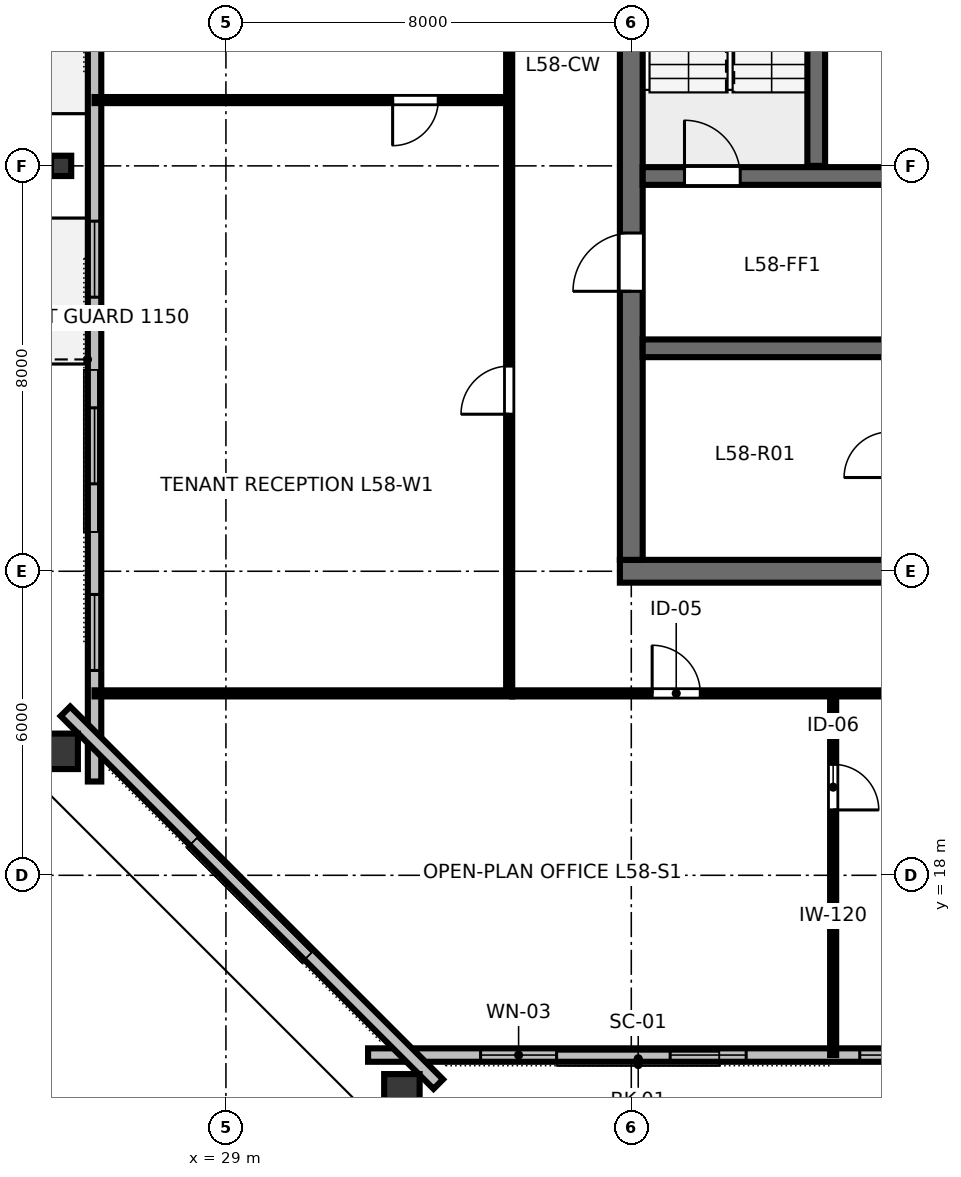
"""IFC4 building model, lengths in metres.
Left out: names, types, materials, properties, quantities, classifications, styles, units other than length and angle.
Written with IfcOpenShell. Run it as: python <this file> out.ifc"""

import sys

from ifc_helpers import new_model, si_unit, direction, frame, frame_2d, origin, origin_2d, place, context, subcontext, project, spatial, rectangle, hollow_rectangle, i_section, extrude, element, fill, save


model = new_model("IFC4")
c1 = context("Model", 3, precision=1e-05, world=origin(), true_north=direction((0.0, 1.0)))
c2 = subcontext(c1, "Body", "Model", "MODEL_VIEW")
j1 = project(units=[si_unit("LENGTHUNIT", "METRE"), si_unit("PLANEANGLEUNIT", "RADIAN")], contexts=[c1])
p1 = place(None, origin())
s1 = spatial("IfcSite", under=j1, at=p1, CompositionType="ELEMENT")
p2 = place(p1, origin())
s2 = spatial("IfcBuilding", under=s1, at=p2, CompositionType="ELEMENT")
p3 = place(p2, frame((0.0, 0.0, 220.2)))
s3 = spatial("IfcBuildingStorey", under=s2, at=p3, CompositionType="ELEMENT", Elevation=220.2)
p4 = place(p3, frame((36.775, 24.0, 0.0), z_axis=(0.0, 0.0, 1.0), x_axis=(1.0, 0.0, 0.0)))
e1 = element("IfcWall", 1, at=p4, inside=s3, PredefinedType="SHEAR", context=c2, shape_type="SweptSolid", body=[
    extrude(rectangle(XDim=18.45, YDim=0.45, at=frame_2d((9.225, 0.0))), origin(), (0.0, 0.0, 1.0), 3.36),
])
p5 = place(p4, frame((13.425, 0.0, 0.0)))
e2 = element("IfcOpeningElement", 2, at=p5, cuts=e1, PredefinedType="OPENING", context=c2, shape_type="SweptSolid", body=[
    extrude(rectangle(XDim=1.6, YDim=2.15, at=frame_2d((0.8, 1.075))), frame((0.0, 0.235, 0.0), z_axis=(0.0, -1.0, 0.0), x_axis=(1.0, 0.0, 0.0)), (0.0, 0.0, 1.0), 0.47),
])
p6 = place(p3, frame((37.0, 24.225, 0.0), z_axis=(0.0, 0.0, 1.0), x_axis=(0.0, 1.0, 0.0)))
e3 = element("IfcWall", 3, at=p6, inside=s3, PredefinedType="SHEAR", context=c2, shape_type="SweptSolid", body=[
    extrude(rectangle(XDim=15.55, YDim=0.45, at=frame_2d((7.775, 0.0))), origin(), (0.0, 0.0, 1.0), 3.36),
])
p7 = place(p6, frame((5.3, 0.0, 0.0)))
e4 = element("IfcOpeningElement", 4, at=p7, cuts=e3, PredefinedType="OPENING", context=c2, shape_type="SweptSolid", body=[
    extrude(rectangle(XDim=1.15, YDim=2.15, at=frame_2d((0.575, 1.075))), frame((0.0, 0.235, 0.0), z_axis=(0.0, -1.0, 0.0), x_axis=(1.0, 0.0, 0.0)), (0.0, 0.0, 1.0), 0.47),
])
p8 = place(p3, frame((37.225, 31.8, 0.0), z_axis=(0.0, 0.0, 1.0), x_axis=(1.0, 0.0, 0.0)))
e5 = element("IfcWall", 5, at=p8, inside=s3, PredefinedType="SHEAR", context=c2, shape_type="SweptSolid", body=[
    extrude(rectangle(XDim=17.55, YDim=0.35, at=frame_2d((8.775, 0.0))), origin(), (0.0, 0.0, 1.0), 3.36),
])
p9 = place(p8, frame((0.825, 0.0, 0.0)))
e6 = element("IfcOpeningElement", 6, at=p9, cuts=e5, PredefinedType="OPENING", context=c2, shape_type="SweptSolid", body=[
    extrude(rectangle(XDim=1.1, YDim=2.15, at=frame_2d((0.55, 1.075))), frame((0.0, 0.185, 0.0), z_axis=(0.0, -1.0, 0.0), x_axis=(1.0, 0.0, 0.0)), (0.0, 0.0, 1.0), 0.37),
])
p10 = place(p8, frame((14.725, 0.0, 0.0)))
e7 = element("IfcOpeningElement", 7, at=p10, cuts=e5, PredefinedType="OPENING", context=c2, shape_type="SweptSolid", body=[
    extrude(rectangle(XDim=1.1, YDim=2.15, at=frame_2d((0.55, 1.075))), frame((0.0, 0.185, 0.0), z_axis=(0.0, -1.0, 0.0), x_axis=(1.0, 0.0, 0.0)), (0.0, 0.0, 1.0), 0.37),
])
p11 = place(p3, frame((37.225, 28.4, 0.0), z_axis=(0.0, 0.0, 1.0), x_axis=(1.0, 0.0, 0.0)))
e8 = element("IfcWall", 8, at=p11, inside=s3, PredefinedType="SHEAR", context=c2, shape_type="SweptSolid", body=[
    extrude(rectangle(XDim=17.55, YDim=0.35, at=frame_2d((8.775, 0.0))), origin(), (0.0, 0.0, 1.0), 3.36),
])
p12 = place(p3, frame((32.473, 13.652, 0.0), z_axis=(0.0, 0.0, 1.0), x_axis=(1.0, 0.0, 0.0)))
e9 = element("IfcColumn", 9, at=p12, inside=s3, PredefinedType="COLUMN", context=c2, shape_type="SweptSolid", body=[
    extrude(hollow_rectangle(XDim=0.7, YDim=0.85, WallThickness=0.04, at=origin_2d()), origin(), (0.0, 0.0, 1.0), 3.373),
])
p13 = place(p3, frame((25.747, 32.0, 0.0), z_axis=(0.0, 0.0, 1.0), x_axis=(0.0, 1.0, 0.0)))
e10 = element("IfcColumn", 10, at=p13, inside=s3, PredefinedType="COLUMN", context=c2, shape_type="SweptSolid", body=[
    extrude(i_section(OverallWidth=0.401, OverallDepth=0.399, WebThickness=0.025, FlangeThickness=0.04, FilletRadius=0.025, at=origin_2d()), origin(), (0.0, 0.0, 1.0), 3.373),
])
p14 = place(p3, frame((25.653, 20.446, 0.0), z_axis=(0.0, 0.0, 1.0), x_axis=(0.0, 1.0, 0.0)))
e11 = element("IfcColumn", 11, at=p14, inside=s3, PredefinedType="COLUMN", context=c2, shape_type="SweptSolid", body=[
    extrude(hollow_rectangle(XDim=0.7, YDim=0.85, WallThickness=0.04, at=origin_2d()), origin(), (0.0, 0.0, 1.0), 3.373),
])
p15 = place(p3, frame((31.805, 14.453, 0.0), z_axis=(0.0, 0.0, 1.0), x_axis=(1.0, 0.0, 0.0)))
e12 = element("IfcWall", 12, at=p15, inside=s3, PredefinedType="STANDARD", context=c2, shape_type="SweptSolid", body=[
    extrude(rectangle(XDim=28.389, YDim=0.265, at=frame_2d((14.195, 0.0))), origin(), (0.0, 0.0, 1.0), 3.375),
])
p16 = place(p15, frame((2.221, 0.0, 0.85)))
e13 = element("IfcOpeningElement", 13, at=p16, cuts=e12, PredefinedType="OPENING", context=c2, shape_type="SweptSolid", body=[
    extrude(rectangle(XDim=1.5, YDim=1.85, at=frame_2d((0.75, 0.925))), frame((0.0, 0.142, 0.0), z_axis=(0.0, -1.0, 0.0), x_axis=(1.0, 0.0, 0.0)), (0.0, 0.0, 1.0), 0.285),
])
p17 = place(p15, frame((5.962, 0.0, 0.85)))
e14 = element("IfcOpeningElement", 14, at=p17, cuts=e12, PredefinedType="OPENING", context=c2, shape_type="SweptSolid", body=[
    extrude(rectangle(XDim=1.5, YDim=1.85, at=frame_2d((0.75, 0.925))), frame((0.0, 0.142, 0.0), z_axis=(0.0, -1.0, 0.0), x_axis=(1.0, 0.0, 0.0)), (0.0, 0.0, 1.0), 0.285),
])
p18 = place(p15, frame((9.703, 0.0, 0.85)))
e15 = element("IfcOpeningElement", 15, at=p18, cuts=e12, PredefinedType="OPENING", context=c2, shape_type="SweptSolid", body=[
    extrude(rectangle(XDim=1.5, YDim=1.85, at=frame_2d((0.75, 0.925))), frame((0.0, 0.142, 0.0), z_axis=(0.0, -1.0, 0.0), x_axis=(1.0, 0.0, 0.0)), (0.0, 0.0, 1.0), 0.285),
])
p19 = place(p15, frame((20.927, 0.0, 0.85)))
e16 = element("IfcOpeningElement", 16, at=p19, cuts=e12, PredefinedType="OPENING", context=c2, shape_type="SweptSolid", body=[
    extrude(rectangle(XDim=1.5, YDim=1.85, at=frame_2d((0.75, 0.925))), frame((0.0, 0.142, 0.0), z_axis=(0.0, -1.0, 0.0), x_axis=(1.0, 0.0, 0.0)), (0.0, 0.0, 1.0), 0.285),
])
p20 = place(p15, frame((24.668, 0.0, 0.85)))
e17 = element("IfcOpeningElement", 17, at=p20, cuts=e12, PredefinedType="OPENING", context=c2, shape_type="SweptSolid", body=[
    extrude(rectangle(XDim=1.5, YDim=1.85, at=frame_2d((0.75, 0.925))), frame((0.0, 0.142, 0.0), z_axis=(0.0, -1.0, 0.0), x_axis=(1.0, 0.0, 0.0)), (0.0, 0.0, 1.0), 0.285),
])
p21 = place(p3, frame((26.407, 44.149, 0.0), z_axis=(0.0, 0.0, 1.0), x_axis=(0.0, -1.0, 0.0)))
e18 = element("IfcWall", 18, at=p21, inside=s3, PredefinedType="STANDARD", context=c2, shape_type="SweptSolid", body=[
    extrude(rectangle(XDim=24.298, YDim=0.265, at=frame_2d((12.149, 0.0))), origin(), (0.0, 0.0, 1.0), 3.375),
])
p22 = place(p21, frame((8.469, 0.0, 0.0)))
e19 = element("IfcOpeningElement", 19, at=p22, cuts=e18, PredefinedType="OPENING", context=c2, shape_type="SweptSolid", body=[
    extrude(rectangle(XDim=1.4, YDim=2.15, at=frame_2d((0.7, 1.075))), frame((0.0, 0.142, 0.0), z_axis=(0.0, -1.0, 0.0), x_axis=(1.0, 0.0, 0.0)), (0.0, 0.0, 1.0), 0.285),
])
p23 = place(p21, frame((2.191, 0.0, 0.85)))
e20 = element("IfcOpeningElement", 20, at=p23, cuts=e18, PredefinedType="OPENING", context=c2, shape_type="SweptSolid", body=[
    extrude(rectangle(XDim=1.5, YDim=1.85, at=frame_2d((0.75, 0.925))), frame((0.0, 0.142, 0.0), z_axis=(0.0, -1.0, 0.0), x_axis=(1.0, 0.0, 0.0)), (0.0, 0.0, 1.0), 0.285),
])
p24 = place(p21, frame((5.875, 0.0, 0.85)))
e21 = element("IfcOpeningElement", 21, at=p24, cuts=e18, PredefinedType="OPENING", context=c2, shape_type="SweptSolid", body=[
    extrude(rectangle(XDim=1.5, YDim=1.85, at=frame_2d((0.75, 0.925))), frame((0.0, 0.142, 0.0), z_axis=(0.0, -1.0, 0.0), x_axis=(1.0, 0.0, 0.0)), (0.0, 0.0, 1.0), 0.285),
])
p25 = place(p21, frame((13.24, 0.0, 0.85)))
e22 = element("IfcOpeningElement", 22, at=p25, cuts=e18, PredefinedType="OPENING", context=c2, shape_type="SweptSolid", body=[
    extrude(rectangle(XDim=1.5, YDim=1.85, at=frame_2d((0.75, 0.925))), frame((0.0, 0.142, 0.0), z_axis=(0.0, -1.0, 0.0), x_axis=(1.0, 0.0, 0.0)), (0.0, 0.0, 1.0), 0.285),
])
p26 = place(p21, frame((16.924, 0.0, 0.85)))
e23 = element("IfcOpeningElement", 23, at=p26, cuts=e18, PredefinedType="OPENING", context=c2, shape_type="SweptSolid", body=[
    extrude(rectangle(XDim=1.5, YDim=1.85, at=frame_2d((0.75, 0.925))), frame((0.0, 0.142, 0.0), z_axis=(0.0, -1.0, 0.0), x_axis=(1.0, 0.0, 0.0)), (0.0, 0.0, 1.0), 0.285),
])
p27 = place(p21, frame((20.607, 0.0, 0.85)))
e24 = element("IfcOpeningElement", 24, at=p27, cuts=e18, PredefinedType="OPENING", context=c2, shape_type="SweptSolid", body=[
    extrude(rectangle(XDim=1.5, YDim=1.85, at=frame_2d((0.75, 0.925))), frame((0.0, 0.142, 0.0), z_axis=(0.0, -1.0, 0.0), x_axis=(1.0, 0.0, 0.0)), (0.0, 0.0, 1.0), 0.285),
])
p28 = place(p3, frame((25.833, 21.236, 0.0), z_axis=(0.0, 0.0, 1.0), x_axis=(0.707106781187, -0.707106781187, 0.0)))
e25 = element("IfcWall", 25, at=p28, inside=s3, PredefinedType="STANDARD", context=c2, shape_type="SweptSolid", body=[
    extrude(rectangle(XDim=10.405, YDim=0.265, at=frame_2d((5.203, 0.0))), origin(), (0.0, 0.0, 1.0), 3.375),
])
p29 = place(p3, frame((40.65, 32.0, 0.0), z_axis=(0.0, 0.0, 1.0), x_axis=(0.0, 1.0, 0.0)))
e26 = element("IfcWall", 26, at=p29, inside=s3, PredefinedType="SHEAR", context=c2, shape_type="SweptSolid", body=[
    extrude(rectangle(XDim=7.7, YDim=0.35, at=frame_2d((3.85, 0.0))), origin(), (0.0, 0.0, 1.0), 3.6),
])
p30 = place(p3, frame((40.984, 21.59, 0.0), z_axis=(0.0, 0.0, 1.0), x_axis=(0.0, -1.0, 0.0)))
e27 = element("IfcWall", 27, at=p30, inside=s3, PredefinedType="PARTITIONING", context=c2, shape_type="SweptSolid", body=[
    extrude(rectangle(XDim=7.137, YDim=0.12, at=frame_2d((3.569, 0.0))), origin(), (0.0, 0.0, 1.0), 2.655),
])
p31 = place(p30, frame((1.4, 0.0, 0.0)))
e28 = element("IfcOpeningElement", 28, at=p31, cuts=e27, PredefinedType="OPENING", context=c2, shape_type="SweptSolid", body=[
    extrude(rectangle(XDim=0.9, YDim=2.15, at=frame_2d((0.45, 1.075))), frame((0.0, 0.07, 0.0), z_axis=(0.0, -1.0, 0.0), x_axis=(1.0, 0.0, 0.0)), (0.0, 0.0, 1.0), 0.14),
])
p32 = place(p3, frame((34.65, 21.59, 0.0), z_axis=(0.0, 0.0, 1.0), x_axis=(1.0, 0.0, 0.0)))
e29 = element("IfcWall", 29, at=p32, inside=s3, PredefinedType="PARTITIONING", context=c2, shape_type="SweptSolid", body=[
    extrude(rectangle(XDim=10.33, YDim=0.12, at=frame_2d((5.165, 0.0))), origin(), (0.0, 0.0, 1.0), 2.655),
])
p33 = place(p32, frame((2.762, 0.0, 0.0)))
e30 = element("IfcOpeningElement", 30, at=p33, cuts=e29, PredefinedType="OPENING", context=c2, shape_type="SweptSolid", body=[
    extrude(rectangle(XDim=0.95, YDim=2.15, at=frame_2d((0.475, 1.075))), frame((0.0, 0.07, 0.0), z_axis=(0.0, -1.0, 0.0), x_axis=(1.0, 0.0, 0.0)), (0.0, 0.0, 1.0), 0.14),
])
p34 = place(p32, frame((7.857, 0.0, 0.0)))
e31 = element("IfcOpeningElement", 31, at=p34, cuts=e29, PredefinedType="OPENING", context=c2, shape_type="SweptSolid", body=[
    extrude(rectangle(XDim=0.95, YDim=2.15, at=frame_2d((0.475, 1.075))), frame((0.0, 0.07, 0.0), z_axis=(0.0, -1.0, 0.0), x_axis=(1.0, 0.0, 0.0)), (0.0, 0.0, 1.0), 0.14),
])
p35 = place(p3, frame((34.59, 33.299, 0.0), z_axis=(0.0, 0.0, 1.0), x_axis=(-1.0, 0.0, 0.0)))
e32 = element("IfcWall", 32, at=p35, inside=s3, PredefinedType="PARTITIONING", context=c2, shape_type="SweptSolid", body=[
    extrude(rectangle(XDim=8.183, YDim=0.12, at=frame_2d((4.091, 0.0))), origin(), (0.0, 0.0, 1.0), 2.655),
])
p36 = place(p35, frame((1.4, 0.0, 0.0)))
e33 = element("IfcOpeningElement", 33, at=p36, cuts=e32, PredefinedType="OPENING", context=c2, shape_type="SweptSolid", body=[
    extrude(rectangle(XDim=0.9, YDim=2.15, at=frame_2d((0.45, 1.075))), frame((0.0, 0.07, 0.0), z_axis=(0.0, -1.0, 0.0), x_axis=(1.0, 0.0, 0.0)), (0.0, 0.0, 1.0), 0.14),
])
p37 = place(p3, frame((34.59, 21.65, 0.0), z_axis=(0.0, 0.0, 1.0), x_axis=(0.0, 1.0, 0.0)))
e34 = element("IfcWall", 34, at=p37, inside=s3, PredefinedType="PARTITIONING", context=c2, shape_type="SweptSolid", body=[
    extrude(rectangle(XDim=20.7, YDim=0.12, at=frame_2d((10.35, 0.0))), origin(), (0.0, 0.0, 1.0), 2.655),
])
p38 = place(p37, frame((5.449, 0.0, 0.0)))
e35 = element("IfcOpeningElement", 35, at=p38, cuts=e34, PredefinedType="OPENING", context=c2, shape_type="SweptSolid", body=[
    extrude(rectangle(XDim=0.95, YDim=2.15, at=frame_2d((0.475, 1.075))), frame((0.0, 0.07, 0.0), z_axis=(0.0, -1.0, 0.0), x_axis=(1.0, 0.0, 0.0)), (0.0, 0.0, 1.0), 0.14),
])
p39 = place(p37, frame((15.599, 0.0, 0.0)))
e36 = element("IfcOpeningElement", 36, at=p39, cuts=e34, PredefinedType="OPENING", context=c2, shape_type="SweptSolid", body=[
    extrude(rectangle(XDim=0.95, YDim=2.15, at=frame_2d((0.475, 1.075))), frame((0.0, 0.07, 0.0), z_axis=(0.0, -1.0, 0.0), x_axis=(1.0, 0.0, 0.0)), (0.0, 0.0, 1.0), 0.14),
])
p40 = place(p3, frame((34.65, 21.59, 0.0), z_axis=(0.0, 0.0, 1.0), x_axis=(-1.0, 0.0, 0.0)))
e37 = element("IfcWall", 37, at=p40, inside=s3, PredefinedType="PARTITIONING", context=c2, shape_type="SweptSolid", body=[
    extrude(rectangle(XDim=8.243, YDim=0.12, at=frame_2d((4.121, 0.0))), origin(), (0.0, 0.0, 1.0), 2.655),
])
p41 = place(p16, origin())
e38 = element("IfcWindow", 38, at=p41, inside=s3, PartitioningType="SINGLE_PANEL", PredefinedType="WINDOW", context=c2, shape_type="SweptSolid", body=[
    extrude(rectangle(XDim=1.5, YDim=1.85, at=frame_2d((0.75, 0.925))), frame((0.0, 0.03, 0.0), z_axis=(0.0, -1.0, 0.0), x_axis=(1.0, 0.0, 0.0)), (0.0, 0.0, 1.0), 0.06),
])
fill(e13, e38)
p42 = place(p17, origin())
e39 = element("IfcWindow", 39, at=p42, inside=s3, PartitioningType="SINGLE_PANEL", PredefinedType="WINDOW", context=c2, shape_type="SweptSolid", body=[
    extrude(rectangle(XDim=1.5, YDim=1.85, at=frame_2d((0.75, 0.925))), frame((0.0, 0.03, 0.0), z_axis=(0.0, -1.0, 0.0), x_axis=(1.0, 0.0, 0.0)), (0.0, 0.0, 1.0), 0.06),
])
fill(e14, e39)
p43 = place(p18, origin())
e40 = element("IfcWindow", 40, at=p43, inside=s3, PartitioningType="SINGLE_PANEL", PredefinedType="WINDOW", context=c2, shape_type="SweptSolid", body=[
    extrude(rectangle(XDim=1.5, YDim=1.85, at=frame_2d((0.75, 0.925))), frame((0.0, 0.03, 0.0), z_axis=(0.0, -1.0, 0.0), x_axis=(1.0, 0.0, 0.0)), (0.0, 0.0, 1.0), 0.06),
])
fill(e15, e40)
p44 = place(p25, origin())
e41 = element("IfcWindow", 41, at=p44, inside=s3, PartitioningType="SINGLE_PANEL", PredefinedType="WINDOW", context=c2, shape_type="SweptSolid", body=[
    extrude(rectangle(XDim=1.5, YDim=1.85, at=frame_2d((0.75, 0.925))), frame((0.0, 0.03, 0.0), z_axis=(0.0, -1.0, 0.0), x_axis=(1.0, 0.0, 0.0)), (0.0, 0.0, 1.0), 0.06),
])
fill(e22, e41)
p45 = place(p26, origin())
e42 = element("IfcWindow", 42, at=p45, inside=s3, PartitioningType="SINGLE_PANEL", PredefinedType="WINDOW", context=c2, shape_type="SweptSolid", body=[
    extrude(rectangle(XDim=1.5, YDim=1.85, at=frame_2d((0.75, 0.925))), frame((0.0, 0.03, 0.0), z_axis=(0.0, -1.0, 0.0), x_axis=(1.0, 0.0, 0.0)), (0.0, 0.0, 1.0), 0.06),
])
fill(e23, e42)
p46 = place(p27, origin())
e43 = element("IfcWindow", 43, at=p46, inside=s3, PartitioningType="SINGLE_PANEL", PredefinedType="WINDOW", context=c2, shape_type="SweptSolid", body=[
    extrude(rectangle(XDim=1.5, YDim=1.85, at=frame_2d((0.75, 0.925))), frame((0.0, 0.03, 0.0), z_axis=(0.0, -1.0, 0.0), x_axis=(1.0, 0.0, 0.0)), (0.0, 0.0, 1.0), 0.06),
])
fill(e24, e43)
p47 = place(p9, origin())
e44 = element("IfcDoor", 44, at=p47, inside=s3, OperationType="SINGLE_SWING_LEFT", PredefinedType="DOOR", context=c2, shape_type="SweptSolid", body=[
    extrude(rectangle(XDim=1.1, YDim=2.15, at=frame_2d((0.55, 1.075))), frame((0.0, 0.025, 0.0), z_axis=(0.0, -1.0, 0.0), x_axis=(1.0, 0.0, 0.0)), (0.0, 0.0, 1.0), 0.05),
])
fill(e6, e44)
p48 = place(p7, origin())
e45 = element("IfcDoor", 45, at=p48, inside=s3, OperationType="SINGLE_SWING_LEFT", PredefinedType="DOOR", context=c2, shape_type="SweptSolid", body=[
    extrude(rectangle(XDim=1.15, YDim=2.15, at=frame_2d((0.575, 1.075))), frame((0.0, 0.025, 0.0), z_axis=(0.0, -1.0, 0.0), x_axis=(1.0, 0.0, 0.0)), (0.0, 0.0, 1.0), 0.05),
])
fill(e4, e45)
p49 = place(p31, origin())
e46 = element("IfcDoor", 46, at=p49, inside=s3, OperationType="SINGLE_SWING_RIGHT", PredefinedType="DOOR", context=c2, shape_type="SweptSolid", body=[
    extrude(rectangle(XDim=0.9, YDim=2.15, at=frame_2d((0.45, 1.075))), frame((0.0, 0.025, 0.0), z_axis=(0.0, -1.0, 0.0), x_axis=(1.0, 0.0, 0.0)), (0.0, 0.0, 1.0), 0.05),
])
fill(e28, e46)
p50 = place(p33, origin())
e47 = element("IfcDoor", 47, at=p50, inside=s3, OperationType="SINGLE_SWING_LEFT", PredefinedType="DOOR", context=c2, shape_type="SweptSolid", body=[
    extrude(rectangle(XDim=0.95, YDim=2.15, at=frame_2d((0.475, 1.075))), frame((0.0, 0.025, 0.0), z_axis=(0.0, -1.0, 0.0), x_axis=(1.0, 0.0, 0.0)), (0.0, 0.0, 1.0), 0.05),
])
fill(e30, e47)
p51 = place(p36, origin())
e48 = element("IfcDoor", 48, at=p51, inside=s3, OperationType="SINGLE_SWING_RIGHT", PredefinedType="DOOR", context=c2, shape_type="SweptSolid", body=[
    extrude(rectangle(XDim=0.9, YDim=2.15, at=frame_2d((0.45, 1.075))), frame((0.0, 0.025, 0.0), z_axis=(0.0, -1.0, 0.0), x_axis=(1.0, 0.0, 0.0)), (0.0, 0.0, 1.0), 0.05),
])
fill(e33, e48)
p52 = place(p38, origin())
e49 = element("IfcDoor", 49, at=p52, inside=s3, OperationType="SINGLE_SWING_LEFT", PredefinedType="DOOR", context=c2, shape_type="SweptSolid", body=[
    extrude(rectangle(XDim=0.95, YDim=2.15, at=frame_2d((0.475, 1.075))), frame((0.0, 0.025, 0.0), z_axis=(0.0, -1.0, 0.0), x_axis=(1.0, 0.0, 0.0)), (0.0, 0.0, 1.0), 0.05),
])
fill(e35, e49)
save(model, sys.argv[1])
